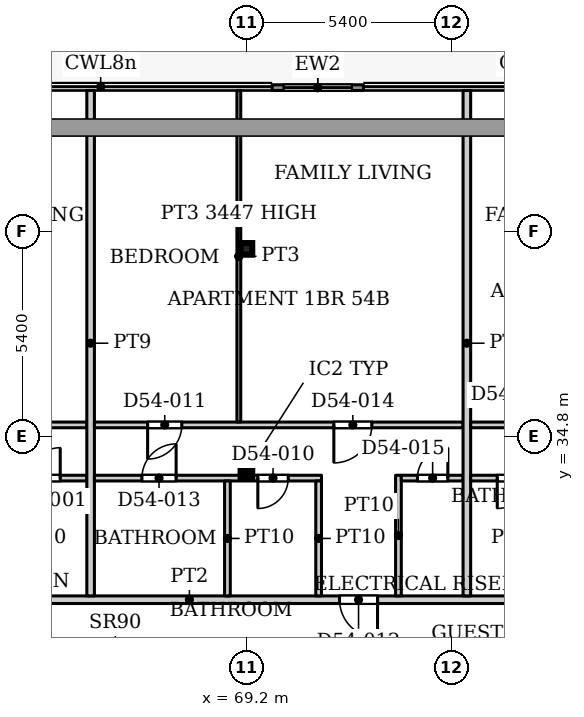
"""IFC4 building model, lengths in metres.
Left out: names, types, materials, properties, quantities, classifications, styles, units other than length and angle.
Written with IfcOpenShell. Run it as: python <this file> out.ifc"""

import sys

from ifc_helpers import new_model, si_unit, direction, frame, frame_2d, origin, origin_2d, place, context, subcontext, project, spatial, rectangle, hollow_rectangle, extrude, source, transform, mapped, element, fill, save


model = new_model("IFC4")
c1 = context("Model", 3, precision=1e-05, world=origin(), true_north=direction((0.0, 1.0)))
c2 = subcontext(c1, "Body", "Model", "MODEL_VIEW")
j1 = project(units=[si_unit("LENGTHUNIT", "METRE"), si_unit("PLANEANGLEUNIT", "RADIAN")], contexts=[c1])
p1 = place(None, origin())
s1 = spatial("IfcSite", under=j1, at=p1, CompositionType="ELEMENT")
p2 = place(p1, origin())
s2 = spatial("IfcBuilding", under=s1, at=p2, CompositionType="ELEMENT")
p3 = place(p2, frame((0.0, 0.0, 231.8)))
s3 = spatial("IfcBuildingStorey", under=s2, at=p3, CompositionType="ELEMENT", Elevation=231.8)
for number, where, z_axis, x_axis in (
    (1, (69.2, 33.863, 0.0), (0.0, 0.0, 1.0), (1.0, 0.0, 0.0)),
    (2, (69.2, 39.732, 0.0), (0.0, 0.0, 1.0), (1.0, 0.0, 0.0)),
):
    element("IfcColumn", number, at=place(p3, frame(where, z_axis=z_axis, x_axis=x_axis)), inside=s3, PredefinedType="COLUMN", context=c2, shape_type="SweptSolid", body=[
        extrude(hollow_rectangle(XDim=0.305, YDim=0.305, WallThickness=0.016, InnerFilletRadius=0.016, OuterFilletRadius=0.032, at=origin_2d()), origin(), (0.0, 0.0, 1.0), 3.9),
    ])
p4 = place(p3, frame((69.877, 43.975, 0.0), z_axis=(0.0, 0.0, 1.0), x_axis=(1.0, 0.0, 0.0)))
e3 = element("IfcWall", 3, at=p4, inside=s3, PredefinedType="SOLIDWALL", context=c2, shape_type="SweptSolid", body=[
    extrude(rectangle(XDim=2.4, YDim=0.15, at=frame_2d((1.2, 0.0))), origin(), (0.0, 0.0, 1.0), 3.75),
])
p5 = place(p4, frame((0.3, 0.0, 0.0)))
e4 = element("IfcOpeningElement", 4, at=p5, cuts=e3, PredefinedType="OPENING", context=c2, shape_type="SweptSolid", body=[
    extrude(rectangle(XDim=1.8, YDim=2.4, at=frame_2d((0.9, 1.2))), frame((0.0, 0.085, 0.0), z_axis=(0.0, -1.0, 0.0), x_axis=(1.0, 0.0, 0.0)), (0.0, 0.0, 1.0), 0.17),
])
p6 = place(p3, frame((53.499, 30.5, 0.0), z_axis=(0.0, 0.0, 1.0), x_axis=(1.0, 0.0, 0.0)))
e5 = element("IfcWall", 5, at=p6, inside=s3, PredefinedType="PARTITIONING", context=c2, shape_type="SweptSolid", body=[
    extrude(rectangle(XDim=28.401, YDim=0.2, at=frame_2d((14.2, 0.0))), origin(), (0.0, 0.0, 1.0), 3.6),
])
p7 = place(p6, frame((0.301, 0.0, 0.0)))
e6 = element("IfcOpeningElement", 6, at=p7, cuts=e5, PredefinedType="OPENING", context=c2, shape_type="SweptSolid", body=[
    extrude(rectangle(XDim=1.0, YDim=2.1, at=frame_2d((0.5, 1.05))), frame((0.0, 0.11, 0.0), z_axis=(0.0, -1.0, 0.0), x_axis=(1.0, 0.0, 0.0)), (0.0, 0.0, 1.0), 0.22),
])
p8 = place(p6, frame((18.151, 0.0, 0.0)))
e7 = element("IfcOpeningElement", 7, at=p8, cuts=e5, PredefinedType="OPENING", context=c2, shape_type="SweptSolid", body=[
    extrude(rectangle(XDim=1.0, YDim=2.1, at=frame_2d((0.5, 1.05))), frame((0.0, 0.11, 0.0), z_axis=(0.0, -1.0, 0.0), x_axis=(1.0, 0.0, 0.0)), (0.0, 0.0, 1.0), 0.22),
])
p9 = place(p6, frame((25.801, 0.0, 0.0)))
e8 = element("IfcOpeningElement", 8, at=p9, cuts=e5, PredefinedType="OPENING", context=c2, shape_type="SweptSolid", body=[
    extrude(rectangle(XDim=1.0, YDim=2.1, at=frame_2d((0.5, 1.05))), frame((0.0, 0.11, 0.0), z_axis=(0.0, -1.0, 0.0), x_axis=(1.0, 0.0, 0.0)), (0.0, 0.0, 1.0), 0.22),
])
p10 = place(p3, frame((53.499, 35.1, 0.0), z_axis=(0.0, 0.0, 1.0), x_axis=(1.0, 0.0, 0.0)))
e9 = element("IfcWall", 9, at=p10, inside=s3, PredefinedType="PARTITIONING", context=c2, shape_type="SweptSolid", body=[
    extrude(rectangle(XDim=11.501, YDim=0.15, at=frame_2d((5.75, 0.0))), origin(), (0.0, 0.0, 1.0), 3.6),
])
p11 = place(p10, frame((5.001, 0.0, 0.0)))
e10 = element("IfcOpeningElement", 10, at=p11, cuts=e9, PredefinedType="OPENING", context=c2, shape_type="SweptSolid", body=[
    extrude(rectangle(XDim=0.9, YDim=2.1, at=frame_2d((0.45, 1.05))), frame((0.0, 0.085, 0.0), z_axis=(0.0, -1.0, 0.0), x_axis=(1.0, 0.0, 0.0)), (0.0, 0.0, 1.0), 0.17),
])
p12 = place(p10, frame((8.851, 0.0, 0.0)))
e11 = element("IfcOpeningElement", 11, at=p12, cuts=e9, PredefinedType="OPENING", context=c2, shape_type="SweptSolid", body=[
    extrude(rectangle(XDim=1.0, YDim=2.1, at=frame_2d((0.5, 1.05))), frame((0.0, 0.085, 0.0), z_axis=(0.0, -1.0, 0.0), x_axis=(1.0, 0.0, 0.0)), (0.0, 0.0, 1.0), 0.17),
])
p13 = place(p10, frame((0.351, 0.0, 0.0)))
e12 = element("IfcOpeningElement", 12, at=p13, cuts=e9, PredefinedType="OPENING", context=c2, shape_type="SweptSolid", body=[
    extrude(rectangle(XDim=0.9, YDim=2.1, at=frame_2d((0.45, 1.05))), frame((0.0, 0.085, 0.0), z_axis=(0.0, -1.0, 0.0), x_axis=(1.0, 0.0, 0.0)), (0.0, 0.0, 1.0), 0.17),
])
p14 = place(p3, frame((55.125, 33.7, 0.0), z_axis=(0.0, 0.0, 1.0), x_axis=(1.0, 0.0, 0.0)))
e13 = element("IfcWall", 13, at=p14, inside=s3, PredefinedType="PARTITIONING", context=c2, shape_type="SweptSolid", body=[
    extrude(rectangle(XDim=9.875, YDim=0.15, at=frame_2d((4.938, 0.0))), origin(), (0.0, 0.0, 1.0), 3.6),
])
p15 = place(p14, frame((8.375, 0.0, 0.0)))
e14 = element("IfcOpeningElement", 14, at=p15, cuts=e13, PredefinedType="OPENING", context=c2, shape_type="SweptSolid", body=[
    extrude(rectangle(XDim=0.8, YDim=2.1, at=frame_2d((0.4, 1.05))), frame((0.0, 0.085, 0.0), z_axis=(0.0, -1.0, 0.0), x_axis=(1.0, 0.0, 0.0)), (0.0, 0.0, 1.0), 0.17),
])
p16 = place(p14, frame((5.975, 0.0, 0.0)))
e15 = element("IfcOpeningElement", 15, at=p16, cuts=e13, PredefinedType="OPENING", context=c2, shape_type="SweptSolid", body=[
    extrude(rectangle(XDim=0.8, YDim=2.1, at=frame_2d((0.4, 1.05))), frame((0.0, 0.085, 0.0), z_axis=(0.0, -1.0, 0.0), x_axis=(1.0, 0.0, 0.0)), (0.0, 0.0, 1.0), 0.17),
])
p17 = place(p14, frame((3.075, 0.0, 0.0)))
e16 = element("IfcOpeningElement", 16, at=p17, cuts=e13, PredefinedType="OPENING", context=c2, shape_type="SweptSolid", body=[
    extrude(rectangle(XDim=0.9, YDim=2.1, at=frame_2d((0.45, 1.05))), frame((0.0, 0.085, 0.0), z_axis=(0.0, -1.0, 0.0), x_axis=(1.0, 0.0, 0.0)), (0.0, 0.0, 1.0), 0.17),
])
p18 = place(p14, frame((0.575, 0.0, 0.0)))
e17 = element("IfcOpeningElement", 17, at=p18, cuts=e13, PredefinedType="OPENING", context=c2, shape_type="SweptSolid", body=[
    extrude(rectangle(XDim=0.8, YDim=2.1, at=frame_2d((0.4, 1.05))), frame((0.0, 0.085, 0.0), z_axis=(0.0, -1.0, 0.0), x_axis=(1.0, 0.0, 0.0)), (0.0, 0.0, 1.0), 0.17),
])
p19 = place(p3, frame((65.1, 30.6, 0.0), z_axis=(0.0, 0.0, 1.0), x_axis=(0.0, 1.0, 0.0)))
e18 = element("IfcWall", 18, at=p19, inside=s3, PredefinedType="PARTITIONING", context=c2, shape_type="SweptSolid", body=[
    extrude(rectangle(XDim=13.3, YDim=0.2, at=frame_2d((6.65, 0.0))), origin(), (0.0, 0.0, 1.0), 3.6),
])
p20 = place(p3, frame((65.2, 33.7, 0.0), z_axis=(0.0, 0.0, 1.0), x_axis=(1.0, 0.0, 0.0)))
e19 = element("IfcWall", 19, at=p20, inside=s3, PredefinedType="PARTITIONING", context=c2, shape_type="SweptSolid", body=[
    extrude(rectangle(XDim=5.975, YDim=0.15, at=frame_2d((2.988, 0.0))), origin(), (0.0, 0.0, 1.0), 3.6),
])
p21 = place(p20, frame((4.3, 0.0, 0.0)))
e20 = element("IfcOpeningElement", 20, at=p21, cuts=e19, PredefinedType="OPENING", context=c2, shape_type="SweptSolid", body=[
    extrude(rectangle(XDim=0.8, YDim=2.1, at=frame_2d((0.4, 1.05))), frame((0.0, 0.085, 0.0), z_axis=(0.0, -1.0, 0.0), x_axis=(1.0, 0.0, 0.0)), (0.0, 0.0, 1.0), 0.17),
])
p22 = place(p20, frame((1.25, 0.0, 0.0)))
e21 = element("IfcOpeningElement", 21, at=p22, cuts=e19, PredefinedType="OPENING", context=c2, shape_type="SweptSolid", body=[
    extrude(rectangle(XDim=0.9, YDim=2.1, at=frame_2d((0.45, 1.05))), frame((0.0, 0.085, 0.0), z_axis=(0.0, -1.0, 0.0), x_axis=(1.0, 0.0, 0.0)), (0.0, 0.0, 1.0), 0.17),
])
p23 = place(p3, frame((65.2, 35.1, 0.0), z_axis=(0.0, 0.0, 1.0), x_axis=(1.0, 0.0, 0.0)))
e22 = element("IfcWall", 22, at=p23, inside=s3, PredefinedType="PARTITIONING", context=c2, shape_type="SweptSolid", body=[
    extrude(rectangle(XDim=9.7, YDim=0.15, at=frame_2d((4.85, 0.0))), origin(), (0.0, 0.0, 1.0), 3.6),
])
p24 = place(p23, frame((1.4, 0.0, 0.0)))
e23 = element("IfcOpeningElement", 23, at=p24, cuts=e22, PredefinedType="OPENING", context=c2, shape_type="SweptSolid", body=[
    extrude(rectangle(XDim=0.9, YDim=2.1, at=frame_2d((0.45, 1.05))), frame((0.0, 0.085, 0.0), z_axis=(0.0, -1.0, 0.0), x_axis=(1.0, 0.0, 0.0)), (0.0, 0.0, 1.0), 0.17),
])
p25 = place(p23, frame((6.3, 0.0, 0.0)))
e24 = element("IfcOpeningElement", 24, at=p25, cuts=e22, PredefinedType="OPENING", context=c2, shape_type="SweptSolid", body=[
    extrude(rectangle(XDim=1.0, YDim=2.1, at=frame_2d((0.5, 1.05))), frame((0.0, 0.085, 0.0), z_axis=(0.0, -1.0, 0.0), x_axis=(1.0, 0.0, 0.0)), (0.0, 0.0, 1.0), 0.17),
])
p26 = place(p3, frame((68.7, 30.6, 0.0), z_axis=(0.0, 0.0, 1.0), x_axis=(0.0, 1.0, 0.0)))
e25 = element("IfcWall", 25, at=p26, inside=s3, PredefinedType="PARTITIONING", context=c2, shape_type="SweptSolid", body=[
    extrude(rectangle(XDim=3.025, YDim=0.15, at=frame_2d((1.512, 0.0))), origin(), (0.0, 0.0, 1.0), 3.6),
])
p27 = place(p3, frame((69.0, 35.175, 0.0), z_axis=(0.0, 0.0, 1.0), x_axis=(0.0, 1.0, 0.0)))
e26 = element("IfcWall", 26, at=p27, inside=s3, PredefinedType="PARTITIONING", context=c2, shape_type="SweptSolid", body=[
    extrude(rectangle(XDim=8.725, YDim=0.1, at=frame_2d((4.362, 0.0))), origin(), (0.0, 0.0, 1.0), 3.447),
])
p28 = place(p3, frame((71.1, 30.6, 0.0), z_axis=(0.0, 0.0, 1.0), x_axis=(0.0, 1.0, 0.0)))
e27 = element("IfcWall", 27, at=p28, inside=s3, PredefinedType="PARTITIONING", context=c2, shape_type="SweptSolid", body=[
    extrude(rectangle(XDim=3.025, YDim=0.15, at=frame_2d((1.512, 0.0))), origin(), (0.0, 0.0, 1.0), 3.6),
])
p29 = place(p3, frame((73.2, 30.6, 0.0), z_axis=(0.0, 0.0, 1.0), x_axis=(0.0, 1.0, 0.0)))
e28 = element("IfcWall", 28, at=p29, inside=s3, PredefinedType="PARTITIONING", context=c2, shape_type="SweptSolid", body=[
    extrude(rectangle(XDim=3.175, YDim=0.15, at=frame_2d((1.587, 0.0))), origin(), (0.0, 0.0, 1.0), 3.6),
])
p30 = place(p3, frame((73.275, 33.7, 0.0), z_axis=(0.0, 0.0, 1.0), x_axis=(1.0, 0.0, 0.0)))
e29 = element("IfcWall", 29, at=p30, inside=s3, PredefinedType="PARTITIONING", context=c2, shape_type="SweptSolid", body=[
    extrude(rectangle(XDim=1.625, YDim=0.15, at=frame_2d((0.812, 0.0))), origin(), (0.0, 0.0, 1.0), 3.6),
])
p31 = place(p30, frame((0.425, 0.0, 0.0)))
e30 = element("IfcOpeningElement", 30, at=p31, cuts=e29, PredefinedType="OPENING", context=c2, shape_type="SweptSolid", body=[
    extrude(rectangle(XDim=0.8, YDim=2.1, at=frame_2d((0.4, 1.05))), frame((0.0, 0.085, 0.0), z_axis=(0.0, -1.0, 0.0), x_axis=(1.0, 0.0, 0.0)), (0.0, 0.0, 1.0), 0.17),
])
p32 = place(p3, frame((75.0, 30.6, 0.0), z_axis=(0.0, 0.0, 1.0), x_axis=(0.0, 1.0, 0.0)))
e31 = element("IfcWall", 31, at=p32, inside=s3, PredefinedType="PARTITIONING", context=c2, shape_type="SweptSolid", body=[
    extrude(rectangle(XDim=13.3, YDim=0.2, at=frame_2d((6.65, 0.0))), origin(), (0.0, 0.0, 1.0), 3.6),
])
p33 = place(p3, frame((75.1, 33.7, 0.0), z_axis=(0.0, 0.0, 1.0), x_axis=(1.0, 0.0, 0.0)))
e32 = element("IfcWall", 32, at=p33, inside=s3, PredefinedType="PARTITIONING", context=c2, shape_type="SweptSolid", body=[
    extrude(rectangle(XDim=3.875, YDim=0.15, at=frame_2d((1.938, 0.0))), origin(), (0.0, 0.0, 1.0), 3.6),
])
p34 = place(p33, frame((0.7, 0.0, 0.0)))
e33 = element("IfcOpeningElement", 33, at=p34, cuts=e32, PredefinedType="OPENING", context=c2, shape_type="SweptSolid", body=[
    extrude(rectangle(XDim=0.8, YDim=2.1, at=frame_2d((0.4, 1.05))), frame((0.0, 0.085, 0.0), z_axis=(0.0, -1.0, 0.0), x_axis=(1.0, 0.0, 0.0)), (0.0, 0.0, 1.0), 0.17),
])
p35 = place(p33, frame((2.65, 0.0, 0.0)))
e34 = element("IfcOpeningElement", 34, at=p35, cuts=e32, PredefinedType="OPENING", context=c2, shape_type="SweptSolid", body=[
    extrude(rectangle(XDim=0.8, YDim=2.1, at=frame_2d((0.4, 1.05))), frame((0.0, 0.085, 0.0), z_axis=(0.0, -1.0, 0.0), x_axis=(1.0, 0.0, 0.0)), (0.0, 0.0, 1.0), 0.17),
])
p36 = place(p3, frame((75.1, 35.1, 0.0), z_axis=(0.0, 0.0, 1.0), x_axis=(1.0, 0.0, 0.0)))
e35 = element("IfcWall", 35, at=p36, inside=s3, PredefinedType="PARTITIONING", context=c2, shape_type="SweptSolid", body=[
    extrude(rectangle(XDim=8.6, YDim=0.15, at=frame_2d((4.3, 0.0))), origin(), (0.0, 0.0, 1.0), 3.6),
])
p37 = place(p36, frame((6.35, 0.0, 0.0)))
e36 = element("IfcOpeningElement", 36, at=p37, cuts=e35, PredefinedType="OPENING", context=c2, shape_type="SweptSolid", body=[
    extrude(rectangle(XDim=0.9, YDim=2.1, at=frame_2d((0.45, 1.05))), frame((0.0, 0.085, 0.0), z_axis=(0.0, -1.0, 0.0), x_axis=(1.0, 0.0, 0.0)), (0.0, 0.0, 1.0), 0.17),
])
p38 = place(p36, frame((1.95, 0.0, 0.0)))
e37 = element("IfcOpeningElement", 37, at=p38, cuts=e35, PredefinedType="OPENING", context=c2, shape_type="SweptSolid", body=[
    extrude(rectangle(XDim=1.0, YDim=2.1, at=frame_2d((0.5, 1.05))), frame((0.0, 0.085, 0.0), z_axis=(0.0, -1.0, 0.0), x_axis=(1.0, 0.0, 0.0)), (0.0, 0.0, 1.0), 0.17),
])
m1 = source(origin(), c2, "Body", "SweptSolid", [
    extrude(rectangle(XDim=1.8, YDim=2.4, at=frame_2d((0.9, 1.2))), frame((0.0, 0.025, 0.0), z_axis=(0.0, -1.0, 0.0), x_axis=(1.0, 0.0, 0.0)), (0.0, 0.0, 1.0), 0.05),
])
p39 = place(p5, origin())
e38 = element("IfcDoor", 38, at=p39, inside=s3, OperationType="SLIDING_TO_LEFT", PredefinedType="DOOR", context=c2, shape_type="MappedRepresentation", body=[
    mapped(m1, transform((0.0, 0.0, 0.0), x_axis=(1.0, 0.0, 0.0), y_axis=(0.0, 1.0, 0.0), z_axis=(0.0, 0.0, 1.0), scale=1.0)),
])
fill(e4, e38)
m2 = source(origin(), c2, "Body", "SweptSolid", [
    extrude(rectangle(XDim=0.8, YDim=2.1, at=frame_2d((0.4, 1.05))), frame((0.0, 0.025, 0.0), z_axis=(0.0, -1.0, 0.0), x_axis=(1.0, 0.0, 0.0)), (0.0, 0.0, 1.0), 0.05),
])
p40 = place(p15, origin())
e39 = element("IfcDoor", 39, at=p40, inside=s3, OperationType="SINGLE_SWING_LEFT", PredefinedType="DOOR", context=c2, shape_type="MappedRepresentation", body=[
    mapped(m2, transform((0.0, 0.0, 0.0), x_axis=(1.0, 0.0, 0.0), y_axis=(0.0, 1.0, 0.0), z_axis=(0.0, 0.0, 1.0), scale=1.0)),
])
fill(e14, e39)
p41 = place(p21, origin())
e40 = element("IfcDoor", 40, at=p41, inside=s3, OperationType="SINGLE_SWING_RIGHT", PredefinedType="DOOR", context=c2, shape_type="MappedRepresentation", body=[
    mapped(m2, transform((0.0, 0.0, 0.0), x_axis=(1.0, 0.0, 0.0), y_axis=(0.0, 1.0, 0.0), z_axis=(0.0, 0.0, 1.0), scale=1.0)),
])
fill(e20, e40)
m3 = source(origin(), c2, "Body", "SweptSolid", [
    extrude(rectangle(XDim=0.9, YDim=2.1, at=frame_2d((0.45, 1.05))), frame((0.0, 0.025, 0.0), z_axis=(0.0, -1.0, 0.0), x_axis=(1.0, 0.0, 0.0)), (0.0, 0.0, 1.0), 0.05),
])
p42 = place(p24, origin())
e41 = element("IfcDoor", 41, at=p42, inside=s3, OperationType="SINGLE_SWING_RIGHT", PredefinedType="DOOR", context=c2, shape_type="MappedRepresentation", body=[
    mapped(m3, transform((0.0, 0.0, 0.0), x_axis=(1.0, 0.0, 0.0), y_axis=(0.0, 1.0, 0.0), z_axis=(0.0, 0.0, 1.0), scale=1.0)),
])
fill(e23, e41)
m4 = source(origin(), c2, "Body", "SweptSolid", [
    extrude(rectangle(XDim=1.0, YDim=2.1, at=frame_2d((0.5, 1.05))), frame((0.0, 0.025, 0.0), z_axis=(0.0, -1.0, 0.0), x_axis=(1.0, 0.0, 0.0)), (0.0, 0.0, 1.0), 0.05),
])
p43 = place(p8, origin())
e42 = element("IfcDoor", 42, at=p43, inside=s3, OperationType="SINGLE_SWING_RIGHT", PredefinedType="DOOR", context=c2, shape_type="MappedRepresentation", body=[
    mapped(m4, transform((0.0, 0.0, 0.0), x_axis=(1.0, 0.0, 0.0), y_axis=(0.0, 1.0, 0.0), z_axis=(0.0, 0.0, 1.0), scale=1.0)),
])
fill(e7, e42)
p44 = place(p22, origin())
e43 = element("IfcDoor", 43, at=p44, inside=s3, OperationType="SINGLE_SWING_LEFT", PredefinedType="DOOR", context=c2, shape_type="MappedRepresentation", body=[
    mapped(m3, transform((0.0, 0.0, 0.0), x_axis=(1.0, 0.0, 0.0), y_axis=(0.0, 1.0, 0.0), z_axis=(0.0, 0.0, 1.0), scale=1.0)),
])
fill(e21, e43)
m5 = source(origin(), c2, "Body", "SweptSolid", [
    extrude(rectangle(XDim=1.0, YDim=2.1, at=frame_2d((0.5, 1.05))), frame((0.0, 0.025, 0.0), z_axis=(0.0, -1.0, 0.0), x_axis=(1.0, 0.0, 0.0)), (0.0, 0.0, 1.0), 0.05),
])
p45 = place(p25, origin())
e44 = element("IfcDoor", 44, at=p45, inside=s3, OperationType="SINGLE_SWING_RIGHT", PredefinedType="DOOR", context=c2, shape_type="MappedRepresentation", body=[
    mapped(m5, transform((0.0, 0.0, 0.0), x_axis=(1.0, 0.0, 0.0), y_axis=(0.0, 1.0, 0.0), z_axis=(0.0, 0.0, 1.0), scale=1.0)),
])
fill(e24, e44)
p46 = place(p31, origin())
e45 = element("IfcDoor", 45, at=p46, inside=s3, OperationType="SINGLE_SWING_LEFT", PredefinedType="DOOR", context=c2, shape_type="MappedRepresentation", body=[
    mapped(m2, transform((0.0, 0.0, 0.0), x_axis=(1.0, 0.0, 0.0), y_axis=(0.0, 1.0, 0.0), z_axis=(0.0, 0.0, 1.0), scale=1.0)),
])
fill(e30, e45)
p47 = place(p34, origin())
e46 = element("IfcDoor", 46, at=p47, inside=s3, OperationType="SINGLE_SWING_RIGHT", PredefinedType="DOOR", context=c2, shape_type="MappedRepresentation", body=[
    mapped(m2, transform((0.0, 0.0, 0.0), x_axis=(1.0, 0.0, 0.0), y_axis=(0.0, 1.0, 0.0), z_axis=(0.0, 0.0, 1.0), scale=1.0)),
])
fill(e33, e46)
save(model, sys.argv[1])
